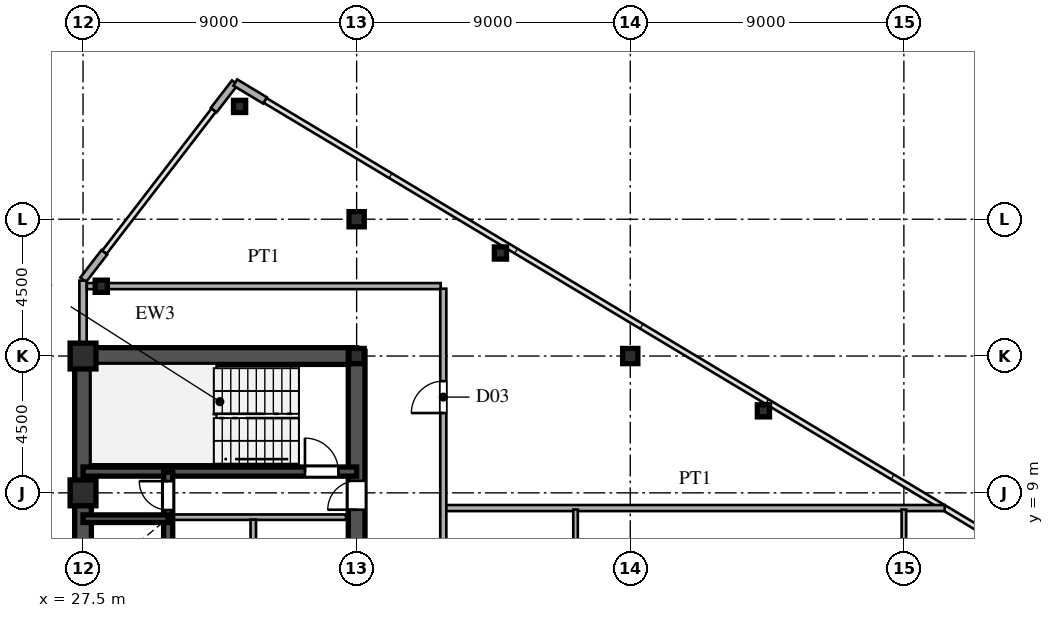
"""IFC4 building model, lengths in metres.
Left out: names, types, materials, properties, quantities, classifications, styles, units other than length and angle.
Written with IfcOpenShell. Run it as: python <this file> out.ifc"""

import sys

from ifc_helpers import new_model, si_unit, direction, frame, frame_2d, origin, origin_2d, place, context, subcontext, project, spatial, rectangle, hollow_rectangle, i_section, extrude, source, transform, mapped, element, fill, save


model = new_model("IFC4")
c1 = context("Model", 3, precision=1e-05, world=origin(), true_north=direction((0.0, 1.0)))
c2 = subcontext(c1, "Body", "Model", "MODEL_VIEW")
j1 = project(units=[si_unit("LENGTHUNIT", "METRE"), si_unit("PLANEANGLEUNIT", "RADIAN")], contexts=[c1])
p1 = place(None, origin())
s1 = spatial("IfcSite", under=j1, at=p1, CompositionType="ELEMENT")
p2 = place(p1, origin())
s2 = spatial("IfcBuilding", under=s1, at=p2, CompositionType="ELEMENT")
p3 = place(p2, frame((0.0, 0.0, 203.1)))
s3 = spatial("IfcBuildingStorey", under=s2, at=p3, CompositionType="ELEMENT", Elevation=203.1)
m1 = source(origin(), c2, "Body", "SweptSolid", [
    extrude(hollow_rectangle(XDim=0.85, YDim=0.85, WallThickness=0.036, at=origin_2d()), origin(), (0.0, 0.0, 1.0), 3.6),
])
for number, where, z_axis, x_axis in (
    (1, (27.5, 9.0, 0.0), (0.0, 0.0, 1.0), (1.0, 0.0, 0.0)),
    (2, (27.5, 13.5, 0.0), (0.0, 0.0, 1.0), (1.0, 0.0, 0.0)),
):
    element("IfcColumn", number, at=place(p3, frame(where, z_axis=z_axis, x_axis=x_axis)), inside=s3, PredefinedType="COLUMN", context=c2, shape_type="MappedRepresentation", body=[
        mapped(m1, transform((0.0, 0.0, 0.0), scale=1.0)),
    ])
m2 = source(origin(), c2, "Body", "SweptSolid", [
    extrude(i_section(OverallWidth=0.5, OverallDepth=0.5, WebThickness=0.02, FlangeThickness=0.032, at=origin_2d()), origin(), (0.0, 0.0, 1.0), 3.6),
])
for number, where, z_axis, x_axis in (
    (3, (36.5, 13.5, 0.0), (0.0, 0.0, 1.0), (1.0, 0.0, 0.0)),
    (4, (36.5, 18.0, 0.0), (0.0, 0.0, 1.0), (1.0, 0.0, 0.0)),
    (5, (45.5, 13.5, 0.0), (0.0, 0.0, 1.0), (1.0, 0.0, 0.0)),
):
    element("IfcColumn", number, at=place(p3, frame(where, z_axis=z_axis, x_axis=x_axis)), inside=s3, PredefinedType="COLUMN", context=c2, shape_type="MappedRepresentation", body=[
        mapped(m2, transform((0.0, 0.0, 0.0), scale=1.0)),
    ])
m3 = source(origin(), c2, "Body", "SweptSolid", [
    extrude(hollow_rectangle(XDim=0.4, YDim=0.4, WallThickness=0.016, at=origin_2d()), origin(), (0.0, 0.0, 1.0), 3.6),
])
for number, where, z_axis, x_axis in (
    (6, (32.65, 21.71, 0.0), (0.0, 0.0, 1.0), (1.0, 0.0, 0.0)),
    (7, (28.1, 15.796, 0.0), (0.0, 0.0, 1.0), (1.0, 0.0, 0.0)),
    (8, (41.23, 16.889, 0.0), (0.0, 0.0, 1.0), (1.0, 0.0, 0.0)),
    (9, (49.88, 11.699, 0.0), (0.0, 0.0, 1.0), (1.0, 0.0, 0.0)),
):
    element("IfcColumn", number, at=place(p3, frame(where, z_axis=z_axis, x_axis=x_axis)), inside=s3, PredefinedType="COLUMN", context=c2, shape_type="MappedRepresentation", body=[
        mapped(m3, transform((0.0, 0.0, 0.0), scale=1.0)),
    ])
for number, where, z_axis, x_axis in (
    (10, (33.486, 21.908, 0.0), (0.0, 0.0, 1.0), (-0.857, 0.515, 0.0)),
    (11, (32.494, 22.492, 0.0), (0.0, 0.0, 1.0), (-0.61, -0.793, 0.0)),
    (12, (28.201, 16.912, 0.0), (0.0, 0.0, 1.0), (-0.61, -0.793, 0.0)),
):
    element("IfcWall", number, at=place(p3, frame(where, z_axis=z_axis, x_axis=x_axis)), inside=s3, PredefinedType="SOLIDWALL", context=c2, shape_type="SweptSolid", body=[
        extrude(rectangle(XDim=1.14, YDim=0.24, at=frame_2d((0.57, 0.0))), origin(), (0.0, 0.0, 1.0), 3.38),
    ])
p4 = place(p3, frame((27.5, 13.78, 0.0), z_axis=(0.0, 0.0, 1.0), x_axis=(0.0, 1.0, 0.0)))
e13 = element("IfcWall", 13, at=p4, inside=s3, PredefinedType="SOLIDWALL", context=c2, shape_type="SweptSolid", body=[
    extrude(rectangle(XDim=0.6, YDim=0.24, at=frame_2d((0.3, 0.0))), origin(), (0.0, 0.0, 1.0), 2.88),
])
p5 = place(p3, frame((27.5, 14.38, 0.0), z_axis=(0.0, 0.0, 1.0), x_axis=(0.0, 1.0, 0.0)))
e14 = element("IfcWall", 14, at=p5, inside=s3, PredefinedType="SOLIDWALL", context=c2, shape_type="SweptSolid", body=[
    extrude(rectangle(XDim=1.6, YDim=0.24, at=frame_2d((0.8, 0.0))), origin(), (0.0, 0.0, 1.0), 3.38),
])
p6 = place(p3, frame((27.5, 1.3, 0.0), z_axis=(0.0, 0.0, 1.0), x_axis=(0.0, 1.0, 0.0)))
e15 = element("IfcWall", 15, at=p6, inside=s3, PredefinedType="SHEAR", context=c2, shape_type="SweptSolid", body=[
    extrude(rectangle(XDim=12.2, YDim=0.55, at=frame_2d((6.1, 0.0))), origin(), (0.0, 0.0, 1.0), 3.38),
])
p7 = place(p3, frame((27.5, 13.5, 0.0), z_axis=(0.0, 0.0, 1.0), x_axis=(1.0, 0.0, 0.0)))
e16 = element("IfcWall", 16, at=p7, inside=s3, PredefinedType="SHEAR", context=c2, shape_type="SweptSolid", body=[
    extrude(rectangle(XDim=9.0, YDim=0.55, at=frame_2d((4.5, 0.0))), origin(), (0.0, 0.0, 1.0), 3.38),
])
p8 = place(p3, frame((36.5, 8.2, 0.0), z_axis=(0.0, 0.0, 1.0), x_axis=(0.0, 1.0, 0.0)))
e17 = element("IfcWall", 17, at=p8, inside=s3, PredefinedType="SHEAR", context=c2, shape_type="SweptSolid", body=[
    extrude(rectangle(XDim=5.45, YDim=0.55, at=frame_2d((2.725, 0.0))), origin(), (0.0, 0.0, 1.0), 3.38),
])
p9 = place(p8, frame((0.245, 0.0, 0.0)))
e18 = element("IfcOpeningElement", 18, at=p9, cuts=e17, PredefinedType="OPENING", context=c2, shape_type="SweptSolid", body=[
    extrude(rectangle(XDim=0.95, YDim=2.15, at=frame_2d((0.475, 1.075))), frame((0.0, 0.285, 0.0), z_axis=(0.0, -1.0, 0.0), x_axis=(1.0, 0.0, 0.0)), (0.0, 0.0, 1.0), 0.57),
])
p10 = place(p3, frame((36.5, 1.3, 0.0), z_axis=(0.0, 0.0, 1.0), x_axis=(0.0, 1.0, 0.0)))
e19 = element("IfcWall", 19, at=p10, inside=s3, PredefinedType="SHEAR", context=c2, shape_type="SweptSolid", body=[
    extrude(rectangle(XDim=6.9, YDim=0.55, at=frame_2d((3.45, 0.0))), origin(), (0.0, 0.0, 1.0), 3.38),
])
p11 = place(p10, frame((2.975, 0.0, 0.0)))
e20 = element("IfcOpeningElement", 20, at=p11, cuts=e19, PredefinedType="OPENING", context=c2, shape_type="SweptSolid", body=[
    extrude(rectangle(XDim=0.95, YDim=2.15, at=frame_2d((0.475, 1.075))), frame((0.0, 0.285, 0.0), z_axis=(0.0, -1.0, 0.0), x_axis=(1.0, 0.0, 0.0)), (0.0, 0.0, 1.0), 0.57),
])
p12 = place(p3, frame((27.5, 9.7, 0.0), z_axis=(0.0, 0.0, 1.0), x_axis=(1.0, 0.0, 0.0)))
e21 = element("IfcWall", 21, at=p12, inside=s3, PredefinedType="SHEAR", context=c2, shape_type="SweptSolid", body=[
    extrude(rectangle(XDim=9.0, YDim=0.3, at=frame_2d((4.5, 0.0))), origin(), (0.0, 0.0, 1.0), 3.38),
])
p13 = place(p12, frame((7.3, 0.0, 0.0)))
e22 = element("IfcOpeningElement", 22, at=p13, cuts=e21, PredefinedType="OPENING", context=c2, shape_type="SweptSolid", body=[
    extrude(rectangle(XDim=1.1, YDim=2.2, at=frame_2d((0.55, 1.1))), frame((0.0, 0.16, 0.0), z_axis=(0.0, -1.0, 0.0), x_axis=(1.0, 0.0, 0.0)), (0.0, 0.0, 1.0), 0.32),
])
p14 = place(p3, frame((27.5, 8.15, 0.0), z_axis=(0.0, 0.0, 1.0), x_axis=(1.0, 0.0, 0.0)))
e23 = element("IfcWall", 23, at=p14, inside=s3, PredefinedType="SHEAR", context=c2, shape_type="SweptSolid", body=[
    extrude(rectangle(XDim=2.8, YDim=0.25, at=frame_2d((1.4, 0.0))), origin(), (0.0, 0.0, 1.0), 3.38),
])
p15 = place(p3, frame((30.3, 5.9, 0.0), z_axis=(0.0, 0.0, 1.0), x_axis=(0.0, 1.0, 0.0)))
e24 = element("IfcWall", 24, at=p15, inside=s3, PredefinedType="SHEAR", context=c2, shape_type="SweptSolid", body=[
    extrude(rectangle(XDim=2.25, YDim=0.3, at=frame_2d((1.125, 0.0))), origin(), (0.0, 0.0, 1.0), 3.38),
])
p16 = place(p3, frame((30.3, 8.15, 0.0), z_axis=(0.0, 0.0, 1.0), x_axis=(0.0, 1.0, 0.0)))
e25 = element("IfcWall", 25, at=p16, inside=s3, PredefinedType="SHEAR", context=c2, shape_type="SweptSolid", body=[
    extrude(rectangle(XDim=1.53, YDim=0.3, at=frame_2d((0.765, 0.0))), origin(), (0.0, 0.0, 1.0), 3.38),
])
p17 = place(p16, frame((0.285, 0.0, 0.0)))
e26 = element("IfcOpeningElement", 26, at=p17, cuts=e25, PredefinedType="OPENING", context=c2, shape_type="SweptSolid", body=[
    extrude(rectangle(XDim=0.95, YDim=2.15, at=frame_2d((0.475, 1.075))), frame((0.0, 0.16, 0.0), z_axis=(0.0, -1.0, 0.0), x_axis=(1.0, 0.0, 0.0)), (0.0, 0.0, 1.0), 0.32),
])
p18 = place(p3, frame((30.45, 8.2, 0.0), z_axis=(0.0, 0.0, 1.0), x_axis=(1.0, 0.0, 0.0)))
e27 = element("IfcWall", 27, at=p18, inside=s3, PredefinedType="PARTITIONING", context=c2, shape_type="SweptSolid", body=[
    extrude(rectangle(XDim=5.7, YDim=0.18, at=frame_2d((2.85, 0.0))), origin(), (0.0, 0.0, 1.0), 3.38),
])
p19 = place(p3, frame((33.1, 1.38, 0.0), z_axis=(0.0, 0.0, 1.0), x_axis=(0.0, 1.0, 0.0)))
e28 = element("IfcWall", 28, at=p19, inside=s3, PredefinedType="PARTITIONING", context=c2, shape_type="SweptSolid", body=[
    extrude(rectangle(XDim=6.74, YDim=0.18, at=frame_2d((3.37, 0.0))), origin(), (0.0, 0.0, 1.0), 3.38),
])
p20 = place(p3, frame((39.43, 8.5, 0.0), z_axis=(0.0, 0.0, 1.0), x_axis=(1.0, 0.0, 0.0)))
e29 = element("IfcWall", 29, at=p20, inside=s3, PredefinedType="PARTITIONING", context=c2, shape_type="SweptSolid", body=[
    extrude(rectangle(XDim=16.413, YDim=0.2, at=frame_2d((8.207, 0.0))), origin(), (0.0, 0.0, 1.0), 3.38),
])
p21 = place(p3, frame((27.625, 15.8, 0.0), z_axis=(0.0, 0.0, 1.0), x_axis=(1.0, 0.0, 0.0)))
e30 = element("IfcWall", 30, at=p21, inside=s3, PredefinedType="PARTITIONING", context=c2, shape_type="SweptSolid", body=[
    extrude(rectangle(XDim=11.64, YDim=0.2, at=frame_2d((5.82, 0.0))), origin(), (0.0, 0.0, 1.0), 3.38),
])
p22 = place(p3, frame((39.35, -15.715, 0.0), z_axis=(0.0, 0.0, 1.0), x_axis=(0.0, 1.0, 0.0)))
e31 = element("IfcWall", 31, at=p22, inside=s3, PredefinedType="PARTITIONING", context=c2, shape_type="SweptSolid", body=[
    extrude(rectangle(XDim=31.43, YDim=0.2, at=frame_2d((15.715, 0.0))), origin(), (0.0, 0.0, 1.0), 3.38),
])
p23 = place(p22, frame((5.04, 0.0, 0.0)))
e32 = element("IfcOpeningElement", 32, at=p23, cuts=e31, PredefinedType="OPENING", context=c2, shape_type="SweptSolid", body=[
    extrude(rectangle(XDim=1.05, YDim=2.25, at=frame_2d((0.525, 1.125))), frame((0.0, 0.11, 0.0), z_axis=(0.0, -1.0, 0.0), x_axis=(1.0, 0.0, 0.0)), (0.0, 0.0, 1.0), 0.22),
])
p24 = place(p22, frame((16.995, 0.0, 0.0)))
e33 = element("IfcOpeningElement", 33, at=p24, cuts=e31, PredefinedType="OPENING", context=c2, shape_type="SweptSolid", body=[
    extrude(rectangle(XDim=1.05, YDim=2.25, at=frame_2d((0.525, 1.125))), frame((0.0, 0.11, 0.0), z_axis=(0.0, -1.0, 0.0), x_axis=(1.0, 0.0, 0.0)), (0.0, 0.0, 1.0), 0.22),
])
p25 = place(p22, frame((27.34, 0.0, 0.0)))
e34 = element("IfcOpeningElement", 34, at=p25, cuts=e31, PredefinedType="OPENING", context=c2, shape_type="SweptSolid", body=[
    extrude(rectangle(XDim=1.05, YDim=2.25, at=frame_2d((0.525, 1.125))), frame((0.0, 0.11, 0.0), z_axis=(0.0, -1.0, 0.0), x_axis=(1.0, 0.0, 0.0)), (0.0, 0.0, 1.0), 0.22),
])
p26 = place(p3, frame((43.7, 4.652, 0.0), z_axis=(0.0, 0.0, 1.0), x_axis=(0.0, 1.0, 0.0)))
e35 = element("IfcWall", 35, at=p26, inside=s3, PredefinedType="PARTITIONING", context=c2, shape_type="SweptSolid", body=[
    extrude(rectangle(XDim=3.798, YDim=0.15, at=frame_2d((1.899, 0.0))), origin(), (0.0, 0.0, 1.0), 3.38),
])
p27 = place(p3, frame((54.5, -4.45, 0.0), z_axis=(0.0, 0.0, 1.0), x_axis=(0.0, 1.0, 0.0)))
e36 = element("IfcWall", 36, at=p27, inside=s3, PredefinedType="PARTITIONING", context=c2, shape_type="SweptSolid", body=[
    extrude(rectangle(XDim=12.9, YDim=0.15, at=frame_2d((6.45, 0.0))), origin(), (0.0, 0.0, 1.0), 2.78),
])
p28 = place(p27, frame((5.975, 0.0, 0.0)))
e37 = element("IfcOpeningElement", 37, at=p28, cuts=e36, PredefinedType="OPENING", context=c2, shape_type="SweptSolid", body=[
    extrude(rectangle(XDim=0.95, YDim=2.15, at=frame_2d((0.475, 1.075))), frame((0.0, 0.085, 0.0), z_axis=(0.0, -1.0, 0.0), x_axis=(1.0, 0.0, 0.0)), (0.0, 0.0, 1.0), 0.17),
])
m4 = source(origin(), c2, "Body", "SweptSolid", [
    extrude(rectangle(XDim=0.95, YDim=2.15, at=frame_2d((0.475, 1.075))), frame((0.0, 0.025, 0.0), z_axis=(0.0, -1.0, 0.0), x_axis=(1.0, 0.0, 0.0)), (0.0, 0.0, 1.0), 0.05),
])
p29 = place(p9, origin())
e38 = element("IfcDoor", 38, at=p29, inside=s3, OperationType="SINGLE_SWING_LEFT", PredefinedType="DOOR", context=c2, shape_type="MappedRepresentation", body=[
    mapped(m4, transform((0.0, 0.0, 0.0), scale=1.0)),
])
fill(e18, e38)
m5 = source(origin(), c2, "Body", "SweptSolid", [
    extrude(rectangle(XDim=1.1, YDim=2.2, at=frame_2d((0.55, 1.1))), frame((0.0, 0.025, 0.0), z_axis=(0.0, -1.0, 0.0), x_axis=(1.0, 0.0, 0.0)), (0.0, 0.0, 1.0), 0.05),
])
p30 = place(p13, origin())
e39 = element("IfcDoor", 39, at=p30, inside=s3, OperationType="SINGLE_SWING_LEFT", PredefinedType="DOOR", context=c2, shape_type="MappedRepresentation", body=[
    mapped(m5, transform((0.0, 0.0, 0.0), scale=1.0)),
])
fill(e22, e39)
p31 = place(p17, origin())
e40 = element("IfcDoor", 40, at=p31, inside=s3, OperationType="SINGLE_SWING_RIGHT", PredefinedType="DOOR", context=c2, shape_type="MappedRepresentation", body=[
    mapped(m4, transform((0.0, 0.0, 0.0), scale=1.0)),
])
fill(e26, e40)
m6 = source(origin(), c2, "Body", "SweptSolid", [
    extrude(rectangle(XDim=1.05, YDim=2.25, at=frame_2d((0.525, 1.125))), frame((0.0, 0.025, 0.0), z_axis=(0.0, -1.0, 0.0), x_axis=(1.0, 0.0, 0.0)), (0.0, 0.0, 1.0), 0.05),
])
p32 = place(p25, origin())
e41 = element("IfcDoor", 41, at=p32, inside=s3, OperationType="SINGLE_SWING_LEFT", PredefinedType="DOOR", context=c2, shape_type="MappedRepresentation", body=[
    mapped(m6, transform((0.0, 0.0, 0.0), scale=1.0)),
])
fill(e34, e41)
save(model, sys.argv[1])
